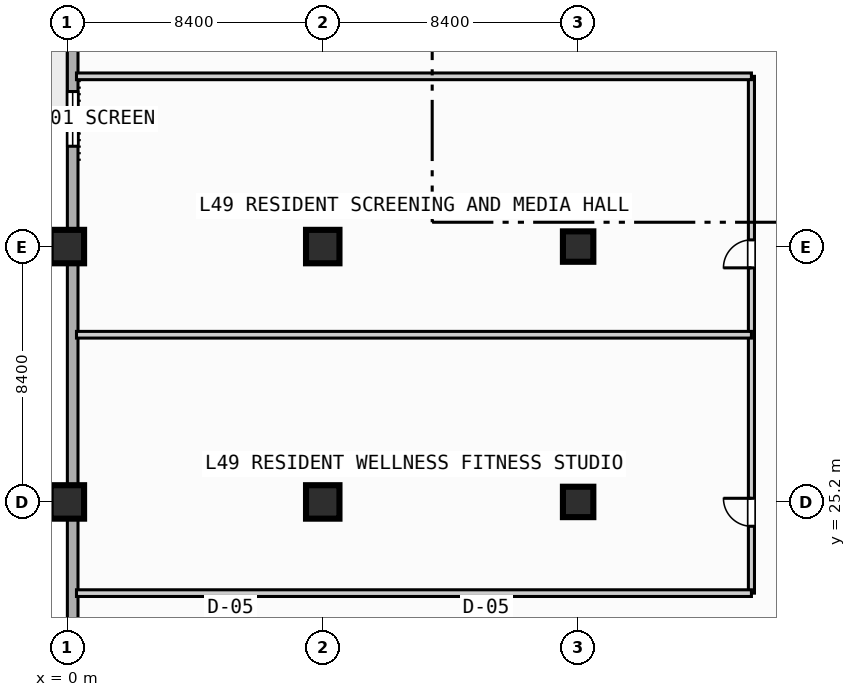
"""IFC4 building model, lengths in metres.
Left out: names, types, materials, properties, quantities, classifications, styles, units other than length and angle.
Written with IfcOpenShell. Run it as: python <this file> out.ifc"""

import sys

from ifc_helpers import new_model, si_unit, direction, frame, frame_2d, origin, origin_2d, place, context, subcontext, project, spatial, rectangle, extrude, element, fill, save


model = new_model("IFC4")
c1 = context("Model", 3, precision=1e-05, world=origin(), true_north=direction((0.0, 1.0)))
c2 = subcontext(c1, "Body", "Model", "MODEL_VIEW")
j1 = project(units=[si_unit("LENGTHUNIT", "METRE"), si_unit("PLANEANGLEUNIT", "RADIAN")], contexts=[c1])
p1 = place(None, origin())
s1 = spatial("IfcSite", under=j1, at=p1, CompositionType="ELEMENT")
p2 = place(p1, origin())
s2 = spatial("IfcBuilding", under=s1, at=p2, CompositionType="ELEMENT")
p3 = place(p2, frame((0.0, 0.0, 201.3)))
s3 = spatial("IfcBuildingStorey", under=s2, at=p3, CompositionType="ELEMENT", Elevation=201.3)
for number, where, z_axis, x_axis in (
    (1, (0.0, 25.2, 0.0), (0.0, 0.0, 1.0), (1.0, 0.0, 0.0)),
    (2, (0.0, 33.6, 0.0), (0.0, 0.0, 1.0), (1.0, 0.0, 0.0)),
    (3, (8.4, 25.2, 0.0), (0.0, 0.0, 1.0), (1.0, 0.0, 0.0)),
    (4, (8.4, 33.6, 0.0), (0.0, 0.0, 1.0), (1.0, 0.0, 0.0)),
):
    element("IfcColumn", number, at=place(p3, frame(where, z_axis=z_axis, x_axis=x_axis)), inside=s3, PredefinedType="COLUMN", context=c2, shape_type="SweptSolid", body=[
        extrude(rectangle(XDim=1.1, YDim=1.1, at=origin_2d()), origin(), (0.0, 0.0, 1.0), 3.7),
    ])
for number, where, z_axis, x_axis in (
    (5, (16.8, 25.2, 0.0), (0.0, 0.0, 1.0), (1.0, 0.0, 0.0)),
    (6, (16.8, 33.6, 0.0), (0.0, 0.0, 1.0), (1.0, 0.0, 0.0)),
):
    element("IfcColumn", number, at=place(p3, frame(where, z_axis=z_axis, x_axis=x_axis)), inside=s3, PredefinedType="COLUMN", context=c2, shape_type="SweptSolid", body=[
        extrude(rectangle(XDim=1.0, YDim=1.0, at=origin_2d()), origin(), (0.0, 0.0, 1.0), 3.7),
    ])
p4 = place(p3, frame((0.175, 3.175, 0.0), z_axis=(0.0, 0.0, 1.0), x_axis=(0.0, 1.0, 0.0)))
e7 = element("IfcWall", 7, at=p4, inside=s3, PredefinedType="STANDARD", context=c2, shape_type="SweptSolid", body=[
    extrude(rectangle(XDim=69.25, YDim=0.35, at=frame_2d((34.625, 0.0))), origin(), (0.0, 0.0, 1.0), 3.47),
])
p5 = place(p4, frame((42.325, 0.0, 0.0)))
e8 = element("IfcOpeningElement", 8, at=p5, cuts=e7, PredefinedType="OPENING", context=c2, shape_type="SweptSolid", body=[
    extrude(rectangle(XDim=1.4, YDim=2.2, at=frame_2d((0.7, 1.1))), frame((0.0, 0.185, 0.0), z_axis=(0.0, -1.0, 0.0), x_axis=(1.0, 0.0, 0.0)), (0.0, 0.0, 1.0), 0.37),
])
p6 = place(p4, frame((33.725, 0.0, 0.85)))
e9 = element("IfcOpeningElement", 9, at=p6, cuts=e7, PredefinedType="OPENING", context=c2, shape_type="SweptSolid", body=[
    extrude(rectangle(XDim=1.8, YDim=1.8, at=frame_2d((0.9, 0.9))), frame((0.0, 0.185, 0.0), z_axis=(0.0, -1.0, 0.0), x_axis=(1.0, 0.0, 0.0)), (0.0, 0.0, 1.0), 0.37),
])
p7 = place(p3, frame((22.5, 22.2, 0.0), z_axis=(0.0, 0.0, 1.0), x_axis=(0.0, 1.0, 0.0)))
e10 = element("IfcWall", 10, at=p7, inside=s3, PredefinedType="PARTITIONING", context=c2, shape_type="SweptSolid", body=[
    extrude(rectangle(XDim=17.0, YDim=0.2, at=frame_2d((8.5, 0.0))), origin(), (0.0, 0.0, 1.0), 3.47),
])
p8 = place(p7, frame((2.2, 0.0, 0.0)))
e11 = element("IfcOpeningElement", 11, at=p8, cuts=e10, PredefinedType="OPENING", context=c2, shape_type="SweptSolid", body=[
    extrude(rectangle(XDim=0.92, YDim=2.1, at=frame_2d((0.46, 1.05))), frame((0.0, 0.11, 0.0), z_axis=(0.0, -1.0, 0.0), x_axis=(1.0, 0.0, 0.0)), (0.0, 0.0, 1.0), 0.22),
])
p9 = place(p7, frame((10.7, 0.0, 0.0)))
e12 = element("IfcOpeningElement", 12, at=p9, cuts=e10, PredefinedType="OPENING", context=c2, shape_type="SweptSolid", body=[
    extrude(rectangle(XDim=0.92, YDim=2.1, at=frame_2d((0.46, 1.05))), frame((0.0, 0.11, 0.0), z_axis=(0.0, -1.0, 0.0), x_axis=(1.0, 0.0, 0.0)), (0.0, 0.0, 1.0), 0.22),
])
for number, where, z_axis, x_axis in (
    (13, (0.3, 22.2, 0.0), (0.0, 0.0, 1.0), (1.0, 0.0, 0.0)),
    (14, (0.3, 30.7, 0.0), (0.0, 0.0, 1.0), (1.0, 0.0, 0.0)),
    (15, (0.3, 39.2, 0.0), (0.0, 0.0, 1.0), (1.0, 0.0, 0.0)),
):
    element("IfcWall", number, at=place(p3, frame(where, z_axis=z_axis, x_axis=x_axis)), inside=s3, PredefinedType="PARTITIONING", context=c2, shape_type="SweptSolid", body=[
        extrude(rectangle(XDim=22.2, YDim=0.22, at=frame_2d((11.1, 0.0))), origin(), (0.0, 0.0, 1.0), 3.47),
    ])
p10 = place(p6, origin())
e16 = element("IfcWindow", 16, at=p10, inside=s3, PartitioningType="SINGLE_PANEL", PredefinedType="WINDOW", context=c2, shape_type="SweptSolid", body=[
    extrude(rectangle(XDim=1.8, YDim=1.8, at=frame_2d((0.9, 0.9))), frame((0.0, 0.03, 0.0), z_axis=(0.0, -1.0, 0.0), x_axis=(1.0, 0.0, 0.0)), (0.0, 0.0, 1.0), 0.06),
])
fill(e9, e16)
p11 = place(p8, origin())
e17 = element("IfcDoor", 17, at=p11, inside=s3, OperationType="SINGLE_SWING_RIGHT", PredefinedType="DOOR", context=c2, shape_type="SweptSolid", body=[
    extrude(rectangle(XDim=0.92, YDim=2.1, at=frame_2d((0.46, 1.05))), frame((0.0, 0.025, 0.0), z_axis=(0.0, -1.0, 0.0), x_axis=(1.0, 0.0, 0.0)), (0.0, 0.0, 1.0), 0.05),
])
fill(e11, e17)
p12 = place(p9, origin())
e18 = element("IfcDoor", 18, at=p12, inside=s3, OperationType="SINGLE_SWING_LEFT", PredefinedType="DOOR", context=c2, shape_type="SweptSolid", body=[
    extrude(rectangle(XDim=0.92, YDim=2.1, at=frame_2d((0.46, 1.05))), frame((0.0, 0.025, 0.0), z_axis=(0.0, -1.0, 0.0), x_axis=(1.0, 0.0, 0.0)), (0.0, 0.0, 1.0), 0.05),
])
fill(e12, e18)
save(model, sys.argv[1])
